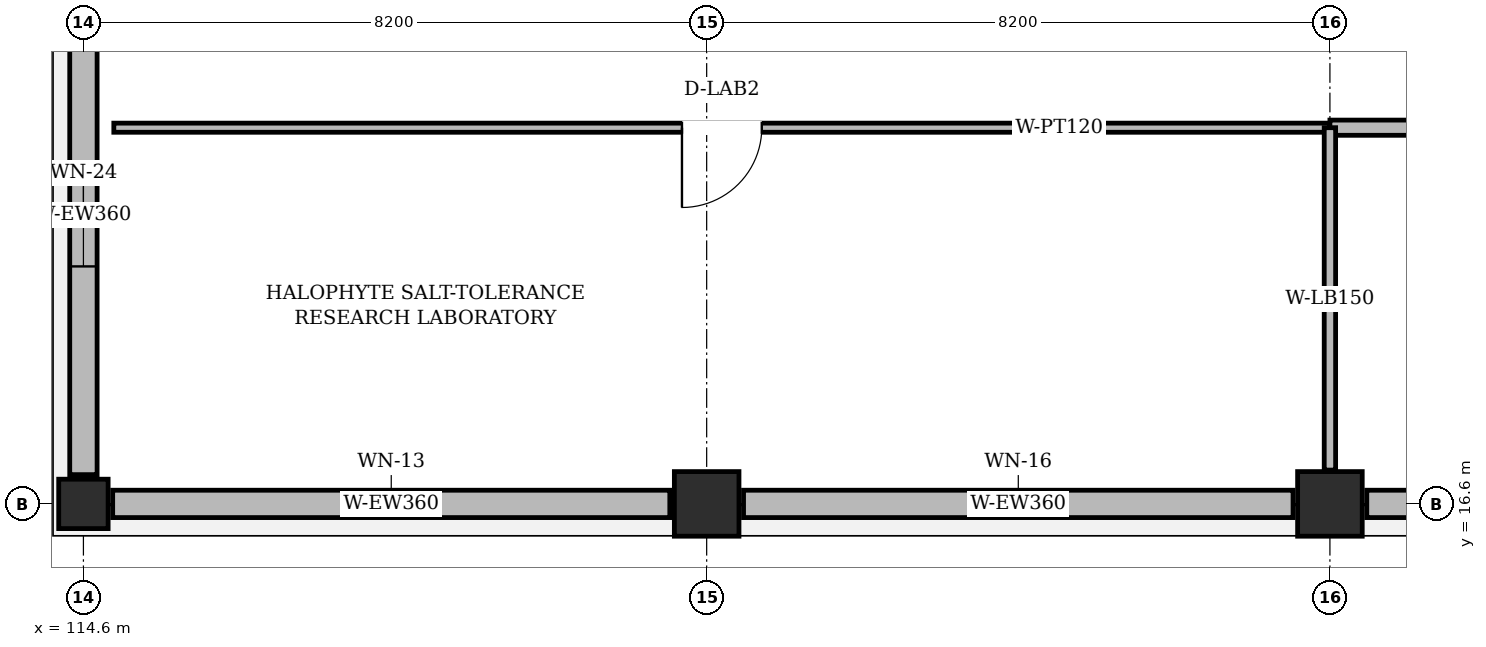
"""IFC4 building model, lengths in metres.
Left out: names, types, materials, properties, quantities, classifications, styles, units other than length and angle.
Written with IfcOpenShell. Run it as: python <this file> out.ifc"""

import sys

from ifc_helpers import new_model, si_unit, direction, frame, frame_2d, origin, origin_2d, place, context, subcontext, project, spatial, rectangle, extrude, element, fill, save


model = new_model("IFC4")
c1 = context("Model", 3, precision=1e-05, world=origin(), true_north=direction((0.0, 1.0)))
c2 = subcontext(c1, "Body", "Model", "MODEL_VIEW")
j1 = project(units=[si_unit("LENGTHUNIT", "METRE"), si_unit("PLANEANGLEUNIT", "RADIAN")], contexts=[c1])
p1 = place(None, origin())
s1 = spatial("IfcSite", under=j1, at=p1, CompositionType="ELEMENT")
p2 = place(p1, origin())
s2 = spatial("IfcBuilding", under=s1, at=p2, CompositionType="ELEMENT")
p3 = place(p2, frame((0.0, 0.0, 19.8)))
s3 = spatial("IfcBuildingStorey", under=s2, at=p3, CompositionType="ELEMENT", Elevation=19.8)
p4 = place(p3, frame((114.6, 16.6, 0.0), z_axis=(0.0, 0.0, 1.0), x_axis=(1.0, 0.0, 0.0)))
e1 = element("IfcColumn", 1, at=p4, inside=s3, PredefinedType="COLUMN", context=c2, shape_type="SweptSolid", body=[
    extrude(rectangle(XDim=0.65, YDim=0.65, at=origin_2d()), origin(), (0.0, 0.0, 1.0), 3.94),
])
for number, where, z_axis, x_axis in (
    (2, (122.8, 16.6, 0.0), (0.0, 0.0, 1.0), (1.0, 0.0, 0.0)),
    (3, (131.0, 16.6, 0.0), (0.0, 0.0, 1.0), (1.0, 0.0, 0.0)),
):
    element("IfcColumn", number, at=place(p3, frame(where, z_axis=z_axis, x_axis=x_axis)), inside=s3, PredefinedType="COLUMN", context=c2, shape_type="SweptSolid", body=[
        extrude(rectangle(XDim=0.85, YDim=0.85, at=origin_2d()), origin(), (0.0, 0.0, 1.0), 3.94),
    ])
p5 = place(p3, frame((114.985, 16.6, 0.0), z_axis=(0.0, 0.0, 1.0), x_axis=(1.0, 0.0, 0.0)))
e4 = element("IfcWall", 4, at=p5, inside=s3, PredefinedType="SOLIDWALL", context=c2, shape_type="SweptSolid", body=[
    extrude(rectangle(XDim=7.33, YDim=0.36, at=frame_2d((3.665, 0.0))), origin(), (0.0, 0.0, 1.0), 3.325),
])
p6 = place(p5, frame((3.19, 0.0, 0.95)))
e5 = element("IfcOpeningElement", 5, at=p6, cuts=e4, PredefinedType="OPENING", context=c2, shape_type="SweptSolid", body=[
    extrude(rectangle(XDim=0.95, YDim=1.25, at=frame_2d((0.475, 0.625))), frame((0.0, 0.192, 0.0), z_axis=(0.0, -1.0, 0.0), x_axis=(1.0, 0.0, 0.0)), (0.0, 0.0, 1.0), 0.384),
])
p7 = place(p3, frame((123.285, 16.6, 0.0), z_axis=(0.0, 0.0, 1.0), x_axis=(1.0, 0.0, 0.0)))
e6 = element("IfcWall", 6, at=p7, inside=s3, PredefinedType="SOLIDWALL", context=c2, shape_type="SweptSolid", body=[
    extrude(rectangle(XDim=7.23, YDim=0.36, at=frame_2d((3.615, 0.0))), origin(), (0.0, 0.0, 1.0), 3.325),
])
p8 = place(p7, frame((3.14, 0.0, 0.95)))
e7 = element("IfcOpeningElement", 7, at=p8, cuts=e6, PredefinedType="OPENING", context=c2, shape_type="SweptSolid", body=[
    extrude(rectangle(XDim=0.95, YDim=2.05, at=frame_2d((0.475, 1.025))), frame((0.0, 0.192, 0.0), z_axis=(0.0, -1.0, 0.0), x_axis=(1.0, 0.0, 0.0)), (0.0, 0.0, 1.0), 0.384),
])
p9 = place(p3, frame((131.485, 16.6, 0.0), z_axis=(0.0, 0.0, 1.0), x_axis=(1.0, 0.0, 0.0)))
e8 = element("IfcWall", 8, at=p9, inside=s3, PredefinedType="SOLIDWALL", context=c2, shape_type="SweptSolid", body=[
    extrude(rectangle(XDim=7.23, YDim=0.36, at=frame_2d((3.615, 0.0))), origin(), (0.0, 0.0, 1.0), 3.325),
])
p10 = place(p9, frame((3.04, 0.0, 0.95)))
e9 = element("IfcOpeningElement", 9, at=p10, cuts=e8, PredefinedType="OPENING", context=c2, shape_type="SweptSolid", body=[
    extrude(rectangle(XDim=1.15, YDim=1.75, at=frame_2d((0.575, 0.875))), frame((0.0, 0.192, 0.0), z_axis=(0.0, -1.0, 0.0), x_axis=(1.0, 0.0, 0.0)), (0.0, 0.0, 1.0), 0.384),
])
p11 = place(p3, frame((114.6, 23.815, 0.0), z_axis=(0.0, 0.0, 1.0), x_axis=(0.0, -1.0, 0.0)))
e10 = element("IfcWall", 10, at=p11, inside=s3, PredefinedType="SOLIDWALL", context=c2, shape_type="SweptSolid", body=[
    extrude(rectangle(XDim=6.83, YDim=0.36, at=frame_2d((3.415, 0.0))), origin(), (0.0, 0.0, 1.0), 3.325),
])
p12 = place(p11, frame((2.74, 0.0, 0.95)))
e11 = element("IfcOpeningElement", 11, at=p12, cuts=e10, PredefinedType="OPENING", context=c2, shape_type="SweptSolid", body=[
    extrude(rectangle(XDim=1.35, YDim=2.05, at=frame_2d((0.675, 1.025))), frame((0.0, 0.192, 0.0), z_axis=(0.0, -1.0, 0.0), x_axis=(1.0, 0.0, 0.0)), (0.0, 0.0, 1.0), 0.384),
])
p13 = place(p3, frame((131.0, 21.55, 0.0), z_axis=(0.0, 0.0, 1.0), x_axis=(-1.0, 0.0, 0.0)))
e12 = element("IfcWall", 12, at=p13, inside=s3, PredefinedType="PARTITIONING", context=c2, shape_type="SweptSolid", body=[
    extrude(rectangle(XDim=16.0, YDim=0.12, at=frame_2d((8.0, 0.0))), origin(), (0.0, 0.0, 1.0), 3.615),
])
p14 = place(p13, frame((7.475, 0.0, 0.0)))
e13 = element("IfcOpeningElement", 13, at=p14, cuts=e12, PredefinedType="OPENING", context=c2, shape_type="SweptSolid", body=[
    extrude(rectangle(XDim=1.05, YDim=2.2, at=frame_2d((0.525, 1.1))), frame((0.0, 0.072, 0.0), z_axis=(0.0, -1.0, 0.0), x_axis=(1.0, 0.0, 0.0)), (0.0, 0.0, 1.0), 0.144),
])
p15 = place(p3, frame((147.95, 21.55, 0.0), z_axis=(0.0, 0.0, 1.0), x_axis=(-1.0, 0.0, 0.0)))
e14 = element("IfcWall", 14, at=p15, inside=s3, PredefinedType="PARTITIONING", context=c2, shape_type="SweptSolid", body=[
    extrude(rectangle(XDim=16.95, YDim=0.2, at=frame_2d((8.475, 0.0))), origin(), (0.0, 0.0, 1.0), 3.515),
])
p16 = place(p15, frame((7.675, 0.0, 0.0)))
e15 = element("IfcOpeningElement", 15, at=p16, cuts=e14, PredefinedType="OPENING", context=c2, shape_type="SweptSolid", body=[
    extrude(rectangle(XDim=1.6, YDim=2.3, at=frame_2d((0.8, 1.15))), frame((0.0, 0.112, 0.0), z_axis=(0.0, -1.0, 0.0), x_axis=(1.0, 0.0, 0.0)), (0.0, 0.0, 1.0), 0.224),
])
p17 = place(p3, frame((131.0, 21.55, 0.0), z_axis=(0.0, 0.0, 1.0), x_axis=(0.0, -1.0, 0.0)))
e16 = element("IfcWall", 16, at=p17, inside=s3, PredefinedType="PARTITIONING", context=c2, shape_type="SweptSolid", body=[
    extrude(rectangle(XDim=4.505, YDim=0.15, at=frame_2d((2.252, 0.0))), origin(), (0.0, 0.0, 1.0), 3.275),
])
p18 = place(p6, origin())
e17 = element("IfcWindow", 17, at=p18, inside=s3, PartitioningType="SINGLE_PANEL", PredefinedType="WINDOW", context=c2, shape_type="SweptSolid", body=[
    extrude(rectangle(XDim=0.95, YDim=1.25, at=frame_2d((0.475, 0.625))), frame((0.0, 0.03, 0.0), z_axis=(0.0, -1.0, 0.0), x_axis=(1.0, 0.0, 0.0)), (0.0, 0.0, 1.0), 0.06),
])
fill(e5, e17)
p19 = place(p8, origin())
e18 = element("IfcWindow", 18, at=p19, inside=s3, PartitioningType="SINGLE_PANEL", PredefinedType="WINDOW", context=c2, shape_type="SweptSolid", body=[
    extrude(rectangle(XDim=0.95, YDim=2.05, at=frame_2d((0.475, 1.025))), frame((0.0, 0.03, 0.0), z_axis=(0.0, -1.0, 0.0), x_axis=(1.0, 0.0, 0.0)), (0.0, 0.0, 1.0), 0.06),
])
fill(e7, e18)
p20 = place(p12, origin())
e19 = element("IfcWindow", 19, at=p20, inside=s3, PartitioningType="SINGLE_PANEL", PredefinedType="WINDOW", context=c2, shape_type="SweptSolid", body=[
    extrude(rectangle(XDim=1.35, YDim=2.05, at=frame_2d((0.675, 1.025))), frame((0.0, 0.03, 0.0), z_axis=(0.0, -1.0, 0.0), x_axis=(1.0, 0.0, 0.0)), (0.0, 0.0, 1.0), 0.06),
])
fill(e11, e19)
p21 = place(p14, origin())
e20 = element("IfcDoor", 20, at=p21, inside=s3, OperationType="SINGLE_SWING_RIGHT", PredefinedType="DOOR", context=c2, shape_type="SweptSolid", body=[
    extrude(rectangle(XDim=1.05, YDim=2.2, at=frame_2d((0.525, 1.1))), frame((0.0, 0.025, 0.0), z_axis=(0.0, -1.0, 0.0), x_axis=(1.0, 0.0, 0.0)), (0.0, 0.0, 1.0), 0.05),
])
fill(e13, e20)
save(model, sys.argv[1])
